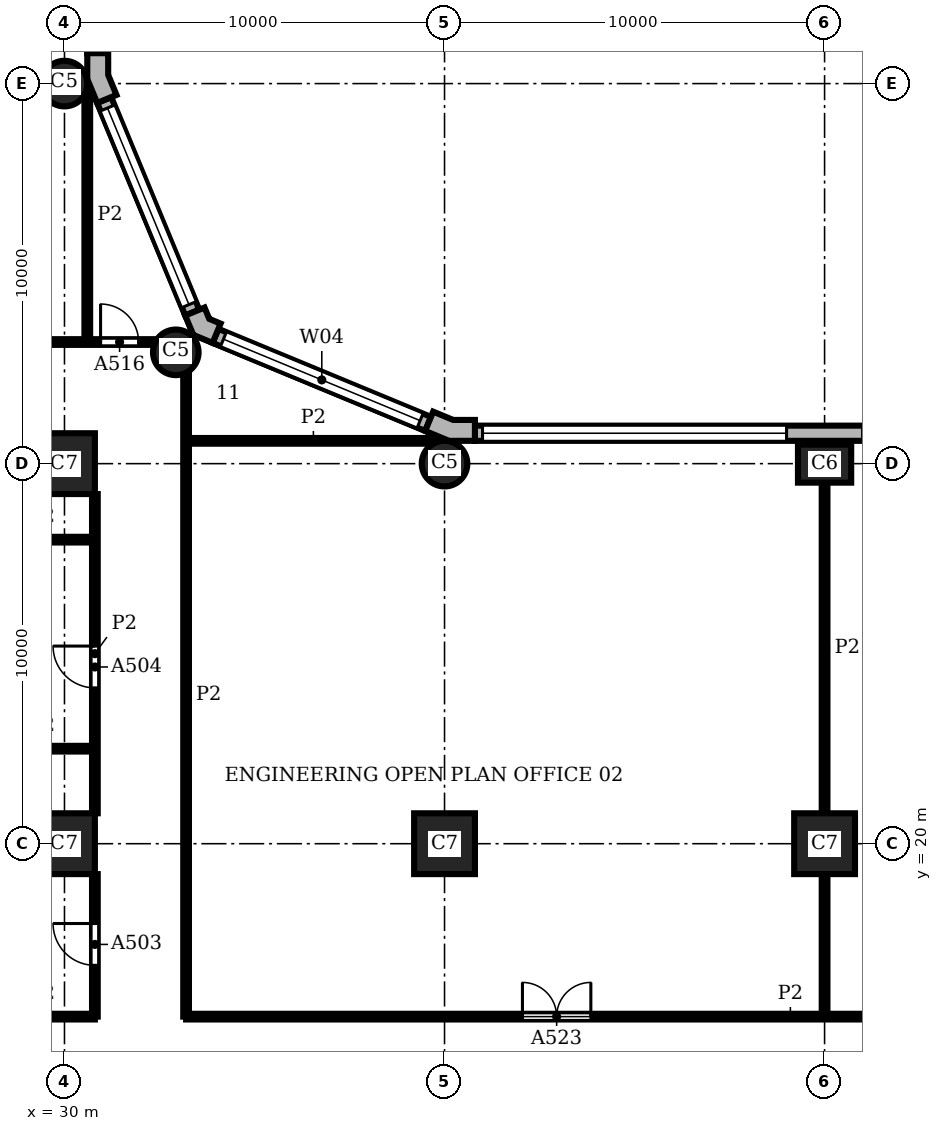
"""IFC4 building model, lengths in metres.
Left out: names, types, materials, properties, quantities, classifications, styles, units other than length and angle.
Written with IfcOpenShell. Run it as: python <this file> out.ifc"""

import sys

from ifc_helpers import new_model, si_unit, direction, frame, frame_2d, origin, origin_2d, place, context, subcontext, project, spatial, polyline, rectangle, circle, outline, extrude, element, fill, save


model = new_model("IFC4")
c1 = context("Model", 3, precision=1e-05, world=origin(), true_north=direction((0.0, 1.0)))
c2 = subcontext(c1, "Body", "Model", "MODEL_VIEW")
j1 = project(units=[si_unit("LENGTHUNIT", "METRE"), si_unit("PLANEANGLEUNIT", "RADIAN")], contexts=[c1])
p1 = place(None, origin())
s1 = spatial("IfcSite", under=j1, at=p1, CompositionType="ELEMENT")
p2 = place(p1, origin())
s2 = spatial("IfcBuilding", under=s1, at=p2, CompositionType="ELEMENT")
p3 = place(p2, frame((0.0, 0.0, 58.8)))
s3 = spatial("IfcBuildingStorey", under=s2, at=p3, CompositionType="ELEMENT", Elevation=58.8)
p4 = place(p3, frame((50.0, 30.0, 0.0), z_axis=(0.0, 0.0, 1.0), x_axis=(1.0, 0.0, 0.0)))
e1 = element("IfcColumn", 1, at=p4, inside=s3, PredefinedType="COLUMN", context=c2, shape_type="SweptSolid", body=[
    extrude(rectangle(XDim=1.4, YDim=1.0, at=origin_2d()), origin(), (0.0, 0.0, 1.0), 3.9),
])
for number, where, z_axis, x_axis in (
    (2, (40.0, 30.0, 0.0), (0.0, 0.0, 1.0), (1.0, 0.0, 0.0)),
    (3, (32.929, 32.929, 0.0), (0.0, 0.0, 1.0), (1.0, 0.0, 0.0)),
    (4, (30.0, 40.0, 0.0), (0.0, 0.0, 1.0), (1.0, 0.0, 0.0)),
):
    element("IfcColumn", number, at=place(p3, frame(where, z_axis=z_axis, x_axis=x_axis)), inside=s3, PredefinedType="COLUMN", context=c2, shape_type="SweptSolid", body=[
        extrude(circle(Radius=0.6, at=origin_2d()), origin(), (0.0, 0.0, 1.0), 3.9),
    ])
for number, where, z_axis, x_axis in (
    (5, (30.0, 20.0, 0.0), (0.0, 0.0, 1.0), (1.0, 0.0, 0.0)),
    (6, (30.0, 30.0, 0.0), (0.0, 0.0, 1.0), (1.0, 0.0, 0.0)),
    (7, (40.0, 20.0, 0.0), (0.0, 0.0, 1.0), (1.0, 0.0, 0.0)),
    (8, (50.0, 20.0, 0.0), (0.0, 0.0, 1.0), (1.0, 0.0, 0.0)),
):
    element("IfcColumn", number, at=place(p3, frame(where, z_axis=z_axis, x_axis=x_axis)), inside=s3, PredefinedType="COLUMN", context=c2, shape_type="SweptSolid", body=[
        extrude(rectangle(XDim=1.6, YDim=1.6, at=origin_2d()), origin(), (0.0, 0.0, 1.0), 3.9),
    ])
p5 = place(p3, origin())
e9 = element("IfcWall", 9, at=p5, inside=s3, PredefinedType="SOLIDWALL", context=c2, shape_type="SweptSolid", body=[
    extrude(outline(polyline([(40.8, 31.0), (40.8, 31.15), (40.229, 31.15), (39.701, 31.369), (39.644, 31.23), (39.49, 30.861), (40.119, 30.6), (40.8, 30.6), (40.8, 31.0)])), origin(), (0.0, 0.0, 1.0), 3.9),
])
e10 = element("IfcWall", 10, at=p5, inside=s3, PredefinedType="SOLIDWALL", context=c2, shape_type="SweptSolid", body=[
    extrude(outline(polyline([(34.051, 33.547), (34.108, 33.685), (33.809, 33.809), (33.685, 34.108), (33.547, 34.051), (33.177, 33.898), (33.388, 33.388), (33.898, 33.177), (34.051, 33.547)])), origin(), (0.0, 0.0, 1.0), 3.9),
])
e11 = element("IfcWall", 11, at=p5, inside=s3, PredefinedType="SOLIDWALL", context=c2, shape_type="SweptSolid", body=[
    extrude(outline(polyline([(31.23, 39.644), (31.369, 39.701), (31.15, 40.229), (31.15, 40.8), (31.0, 40.8), (30.6, 40.8), (30.6, 40.119), (30.861, 39.49), (31.23, 39.644)])), origin(), (0.0, 0.0, 1.0), 3.9),
])
p6 = place(p3, frame((69.2, 30.8, 0.0), z_axis=(0.0, 0.0, 1.0), x_axis=(-1.0, 0.0, 0.0)))
e12 = element("IfcWall", 12, at=p6, inside=s3, PredefinedType="SOLIDWALL", context=c2, shape_type="SweptSolid", body=[
    extrude(rectangle(XDim=28.4, YDim=0.4, at=frame_2d((14.2, 0.0))), origin(), (0.0, 0.0, 1.0), 3.9),
])
p7 = place(p6, frame((0.2, 0.0, 0.9)))
e13 = element("IfcOpeningElement", 13, at=p7, cuts=e12, PredefinedType="OPENING", context=c2, shape_type="SweptSolid", body=[
    extrude(rectangle(XDim=8.0, YDim=2.35, at=frame_2d((4.0, 1.175))), frame((0.0, 0.21, 0.0), z_axis=(0.0, -1.0, 0.0), x_axis=(1.0, 0.0, 0.0)), (0.0, 0.0, 1.0), 0.42),
])
p8 = place(p6, frame((10.2, 0.0, 0.9)))
e14 = element("IfcOpeningElement", 14, at=p8, cuts=e12, PredefinedType="OPENING", context=c2, shape_type="SweptSolid", body=[
    extrude(rectangle(XDim=8.0, YDim=2.35, at=frame_2d((4.0, 1.175))), frame((0.0, 0.21, 0.0), z_axis=(0.0, -1.0, 0.0), x_axis=(1.0, 0.0, 0.0)), (0.0, 0.0, 1.0), 0.42),
])
p9 = place(p6, frame((20.2, 0.0, 0.9)))
e15 = element("IfcOpeningElement", 15, at=p9, cuts=e12, PredefinedType="OPENING", context=c2, shape_type="SweptSolid", body=[
    extrude(rectangle(XDim=8.0, YDim=2.35, at=frame_2d((4.0, 1.175))), frame((0.0, 0.21, 0.0), z_axis=(0.0, -1.0, 0.0), x_axis=(1.0, 0.0, 0.0)), (0.0, 0.0, 1.0), 0.42),
])
p10 = place(p3, frame((39.567, 31.045, 0.0), z_axis=(0.0, 0.0, 1.0), x_axis=(-0.923891000409, 0.382655745237, 0.0)))
e16 = element("IfcWall", 16, at=p10, inside=s3, PredefinedType="SOLIDWALL", context=c2, shape_type="SweptSolid", body=[
    extrude(rectangle(XDim=6.053, YDim=0.4, at=frame_2d((3.027, 0.0))), origin(), (0.0, 0.0, 1.0), 3.9),
])
p11 = place(p10, frame((0.227, 0.0, 0.9)))
e17 = element("IfcOpeningElement", 17, at=p11, cuts=e16, PredefinedType="OPENING", context=c2, shape_type="SweptSolid", body=[
    extrude(rectangle(XDim=5.6, YDim=2.35, at=frame_2d((2.8, 1.175))), frame((0.0, 0.21, 0.0), z_axis=(0.0, -1.0, 0.0), x_axis=(1.0, 0.0, 0.0)), (0.0, 0.0, 1.0), 0.42),
])
p12 = place(p3, frame((33.362, 33.974, 0.0), z_axis=(0.0, 0.0, 1.0), x_axis=(-0.382655745237, 0.923891000409, 0.0)))
e18 = element("IfcWall", 18, at=p12, inside=s3, PredefinedType="SOLIDWALL", context=c2, shape_type="SweptSolid", body=[
    extrude(rectangle(XDim=6.053, YDim=0.4, at=frame_2d((3.027, 0.0))), origin(), (0.0, 0.0, 1.0), 3.9),
])
p13 = place(p12, frame((0.227, 0.0, 0.9)))
e19 = element("IfcOpeningElement", 19, at=p13, cuts=e18, PredefinedType="OPENING", context=c2, shape_type="SweptSolid", body=[
    extrude(rectangle(XDim=5.6, YDim=2.35, at=frame_2d((2.8, 1.175))), frame((0.0, 0.21, 0.0), z_axis=(0.0, -1.0, 0.0), x_axis=(1.0, 0.0, 0.0)), (0.0, 0.0, 1.0), 0.42),
])
p14 = place(p3, frame((30.8, 40.8, 0.0), z_axis=(0.0, 0.0, 1.0), x_axis=(0.0, 1.0, 0.0)))
e20 = element("IfcWall", 20, at=p14, inside=s3, PredefinedType="SOLIDWALL", context=c2, shape_type="SweptSolid", body=[
    extrude(rectangle(XDim=18.4, YDim=0.4, at=frame_2d((9.2, 0.0))), origin(), (0.0, 0.0, 1.0), 3.9),
])
p15 = place(p14, frame((0.2, 0.0, 0.9)))
e21 = element("IfcOpeningElement", 21, at=p15, cuts=e20, PredefinedType="OPENING", context=c2, shape_type="SweptSolid", body=[
    extrude(rectangle(XDim=8.0, YDim=2.35, at=frame_2d((4.0, 1.175))), frame((0.0, 0.21, 0.0), z_axis=(0.0, -1.0, 0.0), x_axis=(1.0, 0.0, 0.0)), (0.0, 0.0, 1.0), 0.42),
])
p16 = place(p14, frame((10.2, 0.0, 0.9)))
e22 = element("IfcOpeningElement", 22, at=p16, cuts=e20, PredefinedType="OPENING", context=c2, shape_type="SweptSolid", body=[
    extrude(rectangle(XDim=8.0, YDim=2.35, at=frame_2d((4.0, 1.175))), frame((0.0, 0.21, 0.0), z_axis=(0.0, -1.0, 0.0), x_axis=(1.0, 0.0, 0.0)), (0.0, 0.0, 1.0), 0.42),
])
p17 = place(p3, frame((30.6, 33.2, 0.0), z_axis=(0.0, 0.0, 1.0), x_axis=(0.0, 1.0, 0.0)))
e23 = element("IfcWall", 23, at=p17, inside=s3, PredefinedType="PARTITIONING", context=c2, shape_type="SweptSolid", body=[
    extrude(rectangle(XDim=6.699, YDim=0.15, at=frame_2d((3.35, 0.0))), origin(), (0.0, 0.0, 1.0), 3.58),
])
p18 = place(p3, frame((30.8, 15.45, 0.0), z_axis=(0.0, 0.0, 1.0), x_axis=(0.0, 1.0, 0.0)))
e24 = element("IfcWall", 24, at=p18, inside=s3, PredefinedType="PARTITIONING", context=c2, shape_type="SweptSolid", body=[
    extrude(rectangle(XDim=3.75, YDim=0.15, at=frame_2d((1.875, 0.0))), origin(), (0.0, 0.0, 1.0), 3.58),
])
p19 = place(p18, frame((1.35, 0.0, 0.0)))
e25 = element("IfcOpeningElement", 25, at=p19, cuts=e24, PredefinedType="OPENING", context=c2, shape_type="SweptSolid", body=[
    extrude(rectangle(XDim=1.1, YDim=2.1, at=frame_2d((0.55, 1.05))), frame((0.0, 0.085, 0.0), z_axis=(0.0, -1.0, 0.0), x_axis=(1.0, 0.0, 0.0)), (0.0, 0.0, 1.0), 0.17),
])
p20 = place(p3, frame((30.8, 20.8, 0.0), z_axis=(0.0, 0.0, 1.0), x_axis=(0.0, 1.0, 0.0)))
e26 = element("IfcWall", 26, at=p20, inside=s3, PredefinedType="PARTITIONING", context=c2, shape_type="SweptSolid", body=[
    extrude(rectangle(XDim=8.4, YDim=0.15, at=frame_2d((4.2, 0.0))), origin(), (0.0, 0.0, 1.0), 3.58),
])
p21 = place(p20, frame((3.3, 0.0, 0.0)))
e27 = element("IfcOpeningElement", 27, at=p21, cuts=e26, PredefinedType="OPENING", context=c2, shape_type="SweptSolid", body=[
    extrude(rectangle(XDim=1.1, YDim=2.1, at=frame_2d((0.55, 1.05))), frame((0.0, 0.085, 0.0), z_axis=(0.0, -1.0, 0.0), x_axis=(1.0, 0.0, 0.0)), (0.0, 0.0, 1.0), 0.17),
])
p22 = place(p3, frame((33.2, 15.45, 0.0), z_axis=(0.0, 0.0, 1.0), x_axis=(0.0, 1.0, 0.0)))
e28 = element("IfcWall", 28, at=p22, inside=s3, PredefinedType="PARTITIONING", context=c2, shape_type="SweptSolid", body=[
    extrude(rectangle(XDim=16.912, YDim=0.15, at=frame_2d((8.456, 0.0))), origin(), (0.0, 0.0, 1.0), 3.58),
])
p23 = place(p3, frame((50.0, 15.45, 0.0), z_axis=(0.0, 0.0, 1.0), x_axis=(0.0, 1.0, 0.0)))
e29 = element("IfcWall", 29, at=p23, inside=s3, PredefinedType="PARTITIONING", context=c2, shape_type="SweptSolid", body=[
    extrude(rectangle(XDim=3.75, YDim=0.15, at=frame_2d((1.875, 0.0))), origin(), (0.0, 0.0, 1.0), 3.58),
])
p24 = place(p3, frame((50.0, 20.8, 0.0), z_axis=(0.0, 0.0, 1.0), x_axis=(0.0, 1.0, 0.0)))
e30 = element("IfcWall", 30, at=p24, inside=s3, PredefinedType="PARTITIONING", context=c2, shape_type="SweptSolid", body=[
    extrude(rectangle(XDim=8.7, YDim=0.15, at=frame_2d((4.35, 0.0))), origin(), (0.0, 0.0, 1.0), 3.58),
])
p25 = place(p3, frame((28.0, 15.45, 0.0), z_axis=(0.0, 0.0, 1.0), x_axis=(1.0, 0.0, 0.0)))
e31 = element("IfcWall", 31, at=p25, inside=s3, PredefinedType="PARTITIONING", context=c2, shape_type="SweptSolid", body=[
    extrude(rectangle(XDim=2.8, YDim=0.15, at=frame_2d((1.4, 0.0))), origin(), (0.0, 0.0, 1.0), 3.58),
])
p26 = place(p3, frame((33.2, 15.45, 0.0), z_axis=(0.0, 0.0, 1.0), x_axis=(1.0, 0.0, 0.0)))
e32 = element("IfcWall", 32, at=p26, inside=s3, PredefinedType="PARTITIONING", context=c2, shape_type="SweptSolid", body=[
    extrude(rectangle(XDim=31.8, YDim=0.15, at=frame_2d((15.9, 0.0))), origin(), (0.0, 0.0, 1.0), 3.58),
])
p27 = place(p26, frame((8.85, 0.0, 0.0)))
e33 = element("IfcOpeningElement", 33, at=p27, cuts=e32, PredefinedType="OPENING", context=c2, shape_type="SweptSolid", body=[
    extrude(rectangle(XDim=1.8, YDim=2.1, at=frame_2d((0.9, 1.05))), frame((0.0, 0.085, 0.0), z_axis=(0.0, -1.0, 0.0), x_axis=(1.0, 0.0, 0.0)), (0.0, 0.0, 1.0), 0.17),
])
for number, where, z_axis, x_axis in (
    (34, (28.0, 22.5, 0.0), (0.0, 0.0, 1.0), (1.0, 0.0, 0.0)),
    (35, (28.0, 28.0, 0.0), (0.0, 0.0, 1.0), (1.0, 0.0, 0.0)),
):
    element("IfcWall", number, at=place(p3, frame(where, z_axis=z_axis, x_axis=x_axis)), inside=s3, PredefinedType="PARTITIONING", context=c2, shape_type="SweptSolid", body=[
        extrude(rectangle(XDim=2.8, YDim=0.15, at=frame_2d((1.4, 0.0))), origin(), (0.0, 0.0, 1.0), 3.58),
    ])
p28 = place(p3, frame((33.2, 30.6, 0.0), z_axis=(0.0, 0.0, 1.0), x_axis=(1.0, 0.0, 0.0)))
e36 = element("IfcWall", 36, at=p28, inside=s3, PredefinedType="PARTITIONING", context=c2, shape_type="SweptSolid", body=[
    extrude(rectangle(XDim=6.699, YDim=0.15, at=frame_2d((3.35, 0.0))), origin(), (0.0, 0.0, 1.0), 3.58),
])
p29 = place(p3, frame((16.2, 33.2, 0.0), z_axis=(0.0, 0.0, 1.0), x_axis=(1.0, 0.0, 0.0)))
e37 = element("IfcWall", 37, at=p29, inside=s3, PredefinedType="PARTITIONING", context=c2, shape_type="SweptSolid", body=[
    extrude(rectangle(XDim=16.162, YDim=0.15, at=frame_2d((8.081, 0.0))), origin(), (0.0, 0.0, 1.0), 3.58),
])
p30 = place(p29, frame((9.1, 0.0, 0.0)))
e38 = element("IfcOpeningElement", 38, at=p30, cuts=e37, PredefinedType="OPENING", context=c2, shape_type="SweptSolid", body=[
    extrude(rectangle(XDim=1.8, YDim=2.1, at=frame_2d((0.9, 1.05))), frame((0.0, 0.085, 0.0), z_axis=(0.0, -1.0, 0.0), x_axis=(1.0, 0.0, 0.0)), (0.0, 0.0, 1.0), 0.17),
])
p31 = place(p29, frame((14.75, 0.0, 0.0)))
e39 = element("IfcOpeningElement", 39, at=p31, cuts=e37, PredefinedType="OPENING", context=c2, shape_type="SweptSolid", body=[
    extrude(rectangle(XDim=1.0, YDim=2.1, at=frame_2d((0.5, 1.05))), frame((0.0, 0.085, 0.0), z_axis=(0.0, -1.0, 0.0), x_axis=(1.0, 0.0, 0.0)), (0.0, 0.0, 1.0), 0.17),
])
p32 = place(p9, origin())
e40 = element("IfcWindow", 40, at=p32, inside=s3, PartitioningType="SINGLE_PANEL", PredefinedType="WINDOW", context=c2, shape_type="SweptSolid", body=[
    extrude(rectangle(XDim=8.0, YDim=2.35, at=frame_2d((4.0, 1.175))), frame((0.0, 0.16, 0.0), z_axis=(0.0, -1.0, 0.0), x_axis=(1.0, 0.0, 0.0)), (0.0, 0.0, 1.0), 0.06),
])
fill(e15, e40)
p33 = place(p11, origin())
e41 = element("IfcWindow", 41, at=p33, inside=s3, PartitioningType="SINGLE_PANEL", PredefinedType="WINDOW", context=c2, shape_type="SweptSolid", body=[
    extrude(rectangle(XDim=5.6, YDim=2.35, at=frame_2d((2.8, 1.175))), frame((0.0, 0.16, 0.0), z_axis=(0.0, -1.0, 0.0), x_axis=(1.0, 0.0, 0.0)), (0.0, 0.0, 1.0), 0.06),
])
fill(e17, e41)
p34 = place(p13, origin())
e42 = element("IfcWindow", 42, at=p34, inside=s3, PartitioningType="SINGLE_PANEL", PredefinedType="WINDOW", context=c2, shape_type="SweptSolid", body=[
    extrude(rectangle(XDim=5.6, YDim=2.35, at=frame_2d((2.8, 1.175))), frame((0.0, 0.16, 0.0), z_axis=(0.0, -1.0, 0.0), x_axis=(1.0, 0.0, 0.0)), (0.0, 0.0, 1.0), 0.06),
])
fill(e19, e42)
p35 = place(p19, origin())
e43 = element("IfcDoor", 43, at=p35, inside=s3, OperationType="SINGLE_SWING_RIGHT", PredefinedType="DOOR", context=c2, shape_type="SweptSolid", body=[
    extrude(rectangle(XDim=1.1, YDim=2.1, at=frame_2d((0.55, 1.05))), frame((0.0, 0.025, 0.0), z_axis=(0.0, -1.0, 0.0), x_axis=(1.0, 0.0, 0.0)), (0.0, 0.0, 1.0), 0.05),
])
fill(e25, e43)
p36 = place(p21, origin())
e44 = element("IfcDoor", 44, at=p36, inside=s3, OperationType="SINGLE_SWING_RIGHT", PredefinedType="DOOR", context=c2, shape_type="SweptSolid", body=[
    extrude(rectangle(XDim=1.1, YDim=2.1, at=frame_2d((0.55, 1.05))), frame((0.0, 0.025, 0.0), z_axis=(0.0, -1.0, 0.0), x_axis=(1.0, 0.0, 0.0)), (0.0, 0.0, 1.0), 0.05),
])
fill(e27, e44)
p37 = place(p31, origin())
e45 = element("IfcDoor", 45, at=p37, inside=s3, OperationType="SINGLE_SWING_LEFT", PredefinedType="DOOR", context=c2, shape_type="SweptSolid", body=[
    extrude(rectangle(XDim=1.0, YDim=2.1, at=frame_2d((0.5, 1.05))), frame((0.0, 0.025, 0.0), z_axis=(0.0, -1.0, 0.0), x_axis=(1.0, 0.0, 0.0)), (0.0, 0.0, 1.0), 0.05),
])
fill(e39, e45)
p38 = place(p27, origin())
e46 = element("IfcDoor", 46, at=p38, inside=s3, OperationType="DOUBLE_DOOR_SINGLE_SWING", PredefinedType="DOOR", context=c2, shape_type="SweptSolid", body=[
    extrude(rectangle(XDim=1.8, YDim=2.1, at=frame_2d((0.9, 1.05))), frame((0.0, 0.025, 0.0), z_axis=(0.0, -1.0, 0.0), x_axis=(1.0, 0.0, 0.0)), (0.0, 0.0, 1.0), 0.05),
])
fill(e33, e46)
save(model, sys.argv[1])
